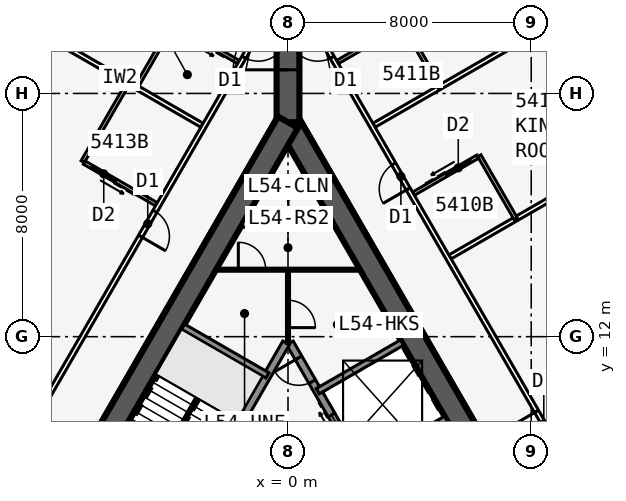
"""IFC4 building model, lengths in metres.
Left out: names, types, materials, properties, quantities, classifications, styles, units other than length and angle.
Written with IfcOpenShell. Run it as: python <this file> out.ifc"""

import sys

from ifc_helpers import new_model, si_unit, direction, frame, frame_2d, origin, place, context, subcontext, project, spatial, rectangle, extrude, element, fill, save


model = new_model("IFC4")
c1 = context("Model", 3, precision=1e-05, world=origin(), true_north=direction((0.0, 1.0)))
c2 = subcontext(c1, "Body", "Model", "MODEL_VIEW")
j1 = project(units=[si_unit("LENGTHUNIT", "METRE"), si_unit("PLANEANGLEUNIT", "RADIAN")], contexts=[c1])
p1 = place(None, origin())
s1 = spatial("IfcSite", under=j1, at=p1, CompositionType="ELEMENT")
p2 = place(p1, origin())
s2 = spatial("IfcBuilding", under=s1, at=p2, CompositionType="ELEMENT")
p3 = place(p2, frame((0.0, 0.0, 204.5)))
s3 = spatial("IfcBuildingStorey", under=s2, at=p3, CompositionType="ELEMENT", Elevation=204.5)
p4 = place(p3, frame((16.5, -9.526, 0.0), z_axis=(0.0, 0.0, 1.0), x_axis=(-0.499999749417, 0.866025548458, 0.0)))
e1 = element("IfcWall", 1, at=p4, inside=s3, PredefinedType="SHEAR", context=c2, shape_type="SweptSolid", body=[
    extrude(rectangle(XDim=33.0, YDim=0.75, at=frame_2d((16.5, 0.0))), origin(), (0.0, 0.0, 1.0), 3.6),
])
p5 = place(p4, frame((14.15, 0.0, 0.0)))
e2 = element("IfcOpeningElement", 2, at=p5, cuts=e1, PredefinedType="OPENING", context=c2, shape_type="SweptSolid", body=[
    extrude(rectangle(XDim=1.8, YDim=2.13, at=frame_2d((0.9, 1.065))), frame((0.0, 0.385, 0.0), z_axis=(0.0, -1.0, 0.0), x_axis=(1.0, 0.0, 0.0)), (0.0, 0.0, 1.0), 0.77),
])
p6 = place(p4, frame((12.6, 0.0, 0.0)))
e3 = element("IfcOpeningElement", 3, at=p6, cuts=e1, PredefinedType="OPENING", context=c2, shape_type="SweptSolid", body=[
    extrude(rectangle(XDim=1.0, YDim=2.13, at=frame_2d((0.5, 1.065))), frame((0.0, 0.385, 0.0), z_axis=(0.0, -1.0, 0.0), x_axis=(1.0, 0.0, 0.0)), (0.0, 0.0, 1.0), 0.77),
])
p7 = place(p3, frame((5.379, 2.586, 0.0), z_axis=(0.0, 0.0, 1.0), x_axis=(-0.500001375892, 0.866024609411, 0.0)))
e4 = element("IfcWall", 4, at=p7, inside=s3, PredefinedType="SOLIDWALL", context=c2, shape_type="SweptSolid", body=[
    extrude(rectangle(XDim=10.633, YDim=0.25, at=frame_2d((5.316, 0.0))), origin(), (0.0, 0.0, 1.0), 3.435),
])
p8 = place(p7, frame((9.164, 0.0, 0.0)))
e5 = element("IfcOpeningElement", 5, at=p8, cuts=e4, PredefinedType="OPENING", context=c2, shape_type="SweptSolid", body=[
    extrude(rectangle(XDim=0.9, YDim=2.13, at=frame_2d((0.45, 1.065))), frame((0.0, 0.135, 0.0), z_axis=(0.0, -1.0, 0.0), x_axis=(1.0, 0.0, 0.0)), (0.0, 0.0, 1.0), 0.27),
])
p9 = place(p7, frame((1.0, 0.0, 0.0)))
e6 = element("IfcOpeningElement", 6, at=p9, cuts=e4, PredefinedType="OPENING", context=c2, shape_type="SweptSolid", body=[
    extrude(rectangle(XDim=1.1, YDim=2.13, at=frame_2d((0.55, 1.065))), frame((0.0, 0.135, 0.0), z_axis=(0.0, -1.0, 0.0), x_axis=(1.0, 0.0, 0.0)), (0.0, 0.0, 1.0), 0.27),
])
p10 = place(p7, frame((3.9, 0.0, 0.0)))
e7 = element("IfcOpeningElement", 7, at=p10, cuts=e4, PredefinedType="OPENING", context=c2, shape_type="SweptSolid", body=[
    extrude(rectangle(XDim=1.1, YDim=2.13, at=frame_2d((0.55, 1.065))), frame((0.0, 0.135, 0.0), z_axis=(0.0, -1.0, 0.0), x_axis=(1.0, 0.0, 0.0)), (0.0, 0.0, 1.0), 0.27),
])
p11 = place(p7, frame((6.8, 0.0, 0.0)))
e8 = element("IfcOpeningElement", 8, at=p11, cuts=e4, PredefinedType="OPENING", context=c2, shape_type="SweptSolid", body=[
    extrude(rectangle(XDim=1.1, YDim=2.13, at=frame_2d((0.55, 1.065))), frame((0.0, 0.135, 0.0), z_axis=(0.0, -1.0, 0.0), x_axis=(1.0, 0.0, 0.0)), (0.0, 0.0, 1.0), 0.27),
])
for number, where, z_axis, x_axis in (
    (9, (2.429, 7.696, 0.0), (0.0, 0.0, 1.0), (0.866, 0.5, 0.0)),
    (10, (0.979, 10.207, 0.0), (0.0, 0.0, 1.0), (0.866, 0.5, 0.0)),
):
    element("IfcWall", number, at=place(p3, frame(where, z_axis=z_axis, x_axis=x_axis)), inside=s3, PredefinedType="SOLIDWALL", context=c2, shape_type="SweptSolid", body=[
        extrude(rectangle(XDim=3.2, YDim=0.2, at=frame_2d((1.6, 0.0))), origin(), (0.0, 0.0, 1.0), 3.435),
    ])
p12 = place(p3, frame((0.0, 19.052, 0.0), z_axis=(0.0, 0.0, 1.0), x_axis=(-0.499999749417, -0.866025548458, 0.0)))
e11 = element("IfcWall", 11, at=p12, inside=s3, PredefinedType="SHEAR", context=c2, shape_type="SweptSolid", body=[
    extrude(rectangle(XDim=33.0, YDim=0.75, at=frame_2d((16.5, 0.0))), origin(), (0.0, 0.0, 1.0), 3.6),
])
p13 = place(p12, frame((14.15, 0.0, 0.0)))
e12 = element("IfcOpeningElement", 12, at=p13, cuts=e11, PredefinedType="OPENING", context=c2, shape_type="SweptSolid", body=[
    extrude(rectangle(XDim=1.8, YDim=2.13, at=frame_2d((0.9, 1.065))), frame((0.0, 0.385, 0.0), z_axis=(0.0, -1.0, 0.0), x_axis=(1.0, 0.0, 0.0)), (0.0, 0.0, 1.0), 0.77),
])
p14 = place(p12, frame((12.6, 0.0, 0.0)))
e13 = element("IfcOpeningElement", 13, at=p14, cuts=e11, PredefinedType="OPENING", context=c2, shape_type="SweptSolid", body=[
    extrude(rectangle(XDim=1.0, YDim=2.13, at=frame_2d((0.5, 1.065))), frame((0.0, 0.385, 0.0), z_axis=(0.0, -1.0, 0.0), x_axis=(1.0, 0.0, 0.0)), (0.0, 0.0, 1.0), 0.77),
])
p15 = place(p3, frame((-0.062, 11.794, 0.0), z_axis=(0.0, 0.0, 1.0), x_axis=(-0.500006680225, -0.86602154692, 0.0)))
e14 = element("IfcWall", 14, at=p15, inside=s3, PredefinedType="SOLIDWALL", context=c2, shape_type="SweptSolid", body=[
    extrude(rectangle(XDim=7.733, YDim=0.25, at=frame_2d((3.866, 0.0))), origin(), (0.0, 0.0, 1.0), 3.435),
])
p16 = place(p3, frame((-0.679, 10.727, 0.0), z_axis=(0.0, 0.0, 1.0), x_axis=(-0.866008981251, 0.500028443584, 0.0)))
e15 = element("IfcWall", 15, at=p16, inside=s3, PredefinedType="SOLIDWALL", context=c2, shape_type="SweptSolid", body=[
    extrude(rectangle(XDim=3.2, YDim=0.2, at=frame_2d((1.6, 0.0))), origin(), (0.0, 0.0, 1.0), 3.435),
])
p17 = place(p3, frame((0.0, 19.052, 0.0), z_axis=(0.0, 0.0, 1.0), x_axis=(0.0, 1.0, 0.0)))
e16 = element("IfcWall", 16, at=p17, inside=s3, PredefinedType="SHEAR", context=c2, shape_type="SweptSolid", body=[
    extrude(rectangle(XDim=4.746, YDim=0.75, at=frame_2d((2.373, 0.0))), origin(), (0.0, 0.0, 1.0), 3.6),
])
p18 = place(p17, frame((1.725, 0.0, 0.0)))
e17 = element("IfcOpeningElement", 17, at=p18, cuts=e16, PredefinedType="OPENING", context=c2, shape_type="SweptSolid", body=[
    extrude(rectangle(XDim=1.8, YDim=2.13, at=frame_2d((0.9, 1.065))), frame((0.0, 0.385, 0.0), z_axis=(0.0, -1.0, 0.0), x_axis=(1.0, 0.0, 0.0)), (0.0, 0.0, 1.0), 0.77),
])
p19 = place(p3, frame((11.754, 18.304, 0.0), z_axis=(0.0, 0.0, 1.0), x_axis=(-0.664348996191, 0.747422511876, 0.0)))
e18 = element("IfcWall", 18, at=p19, inside=s3, PredefinedType="STANDARD", context=c2, shape_type="SweptSolid", body=[
    extrude(rectangle(XDim=5.105, YDim=0.25, at=frame_2d((2.552, 0.0))), origin(), (0.0, 0.0, 1.0), 3.435),
])
p20 = place(p19, frame((0.752, 0.0, 0.45)))
e19 = element("IfcOpeningElement", 19, at=p20, cuts=e18, PredefinedType="OPENING", context=c2, shape_type="SweptSolid", body=[
    extrude(rectangle(XDim=3.6, YDim=2.6, at=frame_2d((1.8, 1.3))), frame((0.0, 0.135, 0.0), z_axis=(0.0, -1.0, 0.0), x_axis=(1.0, 0.0, 0.0)), (0.0, 0.0, 1.0), 0.27),
])
p21 = place(p3, frame((20.102, -11.115, 0.0), z_axis=(0.0, 0.0, 1.0), x_axis=(-0.500000265775, 0.866025250339, 0.0)))
e20 = element("IfcWall", 20, at=p21, inside=s3, PredefinedType="PARTITIONING", context=c2, shape_type="SweptSolid", body=[
    extrude(rectangle(XDim=39.354, YDim=0.15, at=frame_2d((19.677, 0.0))), origin(), (0.0, 0.0, 1.0), 3.435),
])
p22 = place(p21, frame((1.665, 0.0, 0.0)))
e21 = element("IfcOpeningElement", 21, at=p22, cuts=e20, PredefinedType="OPENING", context=c2, shape_type="SweptSolid", body=[
    extrude(rectangle(XDim=0.95, YDim=2.13, at=frame_2d((0.475, 1.065))), frame((0.0, 0.085, 0.0), z_axis=(0.0, -1.0, 0.0), x_axis=(1.0, 0.0, 0.0)), (0.0, 0.0, 1.0), 0.17),
])
p23 = place(p21, frame((12.902, 0.0, 0.0)))
e22 = element("IfcOpeningElement", 22, at=p23, cuts=e20, PredefinedType="OPENING", context=c2, shape_type="SweptSolid", body=[
    extrude(rectangle(XDim=0.95, YDim=2.13, at=frame_2d((0.475, 1.065))), frame((0.0, 0.085, 0.0), z_axis=(0.0, -1.0, 0.0), x_axis=(1.0, 0.0, 0.0)), (0.0, 0.0, 1.0), 0.17),
])
p24 = place(p21, frame((17.302, 0.0, 0.0)))
e23 = element("IfcOpeningElement", 23, at=p24, cuts=e20, PredefinedType="OPENING", context=c2, shape_type="SweptSolid", body=[
    extrude(rectangle(XDim=0.95, YDim=2.13, at=frame_2d((0.475, 1.065))), frame((0.0, 0.085, 0.0), z_axis=(0.0, -1.0, 0.0), x_axis=(1.0, 0.0, 0.0)), (0.0, 0.0, 1.0), 0.17),
])
p25 = place(p21, frame((22.902, 0.0, 0.0)))
e24 = element("IfcOpeningElement", 24, at=p25, cuts=e20, PredefinedType="OPENING", context=c2, shape_type="SweptSolid", body=[
    extrude(rectangle(XDim=0.95, YDim=2.13, at=frame_2d((0.475, 1.065))), frame((0.0, 0.085, 0.0), z_axis=(0.0, -1.0, 0.0), x_axis=(1.0, 0.0, 0.0)), (0.0, 0.0, 1.0), 0.17),
])
p26 = place(p21, frame((32.302, 0.0, 0.0)))
e25 = element("IfcOpeningElement", 25, at=p26, cuts=e20, PredefinedType="OPENING", context=c2, shape_type="SweptSolid", body=[
    extrude(rectangle(XDim=0.95, YDim=2.13, at=frame_2d((0.475, 1.065))), frame((0.0, 0.085, 0.0), z_axis=(0.0, -1.0, 0.0), x_axis=(1.0, 0.0, 0.0)), (0.0, 0.0, 1.0), 0.17),
])
p27 = place(p21, frame((37.302, 0.0, 0.0)))
e26 = element("IfcOpeningElement", 26, at=p27, cuts=e20, PredefinedType="OPENING", context=c2, shape_type="SweptSolid", body=[
    extrude(rectangle(XDim=0.95, YDim=2.13, at=frame_2d((0.475, 1.065))), frame((0.0, 0.085, 0.0), z_axis=(0.0, -1.0, 0.0), x_axis=(1.0, 0.0, 0.0)), (0.0, 0.0, 1.0), 0.17),
])
p28 = place(p3, frame((5.329, 14.623, 0.0), z_axis=(0.0, 0.0, 1.0), x_axis=(0.866017877653, 0.500013035415, 0.0)))
e27 = element("IfcWall", 27, at=p28, inside=s3, PredefinedType="PARTITIONING", context=c2, shape_type="SweptSolid", body=[
    extrude(rectangle(XDim=7.273, YDim=0.15, at=frame_2d((3.636, 0.0))), origin(), (0.0, 0.0, 1.0), 2.589),
])
p29 = place(p3, frame((2.829, 18.954, 0.0), z_axis=(0.0, 0.0, 1.0), x_axis=(0.866026604282, 0.499997920671, 0.0)))
e28 = element("IfcWall", 28, at=p29, inside=s3, PredefinedType="PARTITIONING", context=c2, shape_type="SweptSolid", body=[
    extrude(rectangle(XDim=6.24, YDim=0.15, at=frame_2d((3.12, 0.0))), origin(), (0.0, 0.0, 1.0), 2.589),
])
p30 = place(p3, frame((7.493, 15.873, 0.0), z_axis=(0.0, 0.0, 1.0), x_axis=(-0.499957262057, 0.866050077142, 0.0)))
e29 = element("IfcWall", 29, at=p30, inside=s3, PredefinedType="PLUMBINGWALL", context=c2, shape_type="SweptSolid", body=[
    extrude(rectangle(XDim=2.4, YDim=0.12, at=frame_2d((1.2, 0.0))), origin(), (0.0, 0.0, 1.0), 3.435),
])
p31 = place(p3, frame((4.128, 16.702, 0.0), z_axis=(0.0, 0.0, 1.0), x_axis=(0.866048967903, 0.499959183527, 0.0)))
e30 = element("IfcWall", 30, at=p31, inside=s3, PredefinedType="PLUMBINGWALL", context=c2, shape_type="SweptSolid", body=[
    extrude(rectangle(XDim=2.44, YDim=0.12, at=frame_2d((1.22, 0.0))), origin(), (0.0, 0.0, 1.0), 3.435),
])
p32 = place(p31, frame((1.25, 0.0, 0.0)))
e31 = element("IfcOpeningElement", 31, at=p32, cuts=e30, PredefinedType="OPENING", context=c2, shape_type="SweptSolid", body=[
    extrude(rectangle(XDim=0.9, YDim=2.13, at=frame_2d((0.45, 1.065))), frame((0.0, 0.07, 0.0), z_axis=(0.0, -1.0, 0.0), x_axis=(1.0, 0.0, 0.0)), (0.0, 0.0, 1.0), 0.14),
])
p33 = place(p3, frame((4.993, 20.204, 0.0), z_axis=(0.0, 0.0, 1.0), x_axis=(-0.500001309137, 0.866024647952, 0.0)))
e32 = element("IfcWall", 32, at=p33, inside=s3, PredefinedType="PLUMBINGWALL", context=c2, shape_type="SweptSolid", body=[
    extrude(rectangle(XDim=2.4, YDim=0.12, at=frame_2d((1.2, 0.0))), origin(), (0.0, 0.0, 1.0), 3.435),
])
p34 = place(p3, frame((1.628, 21.032, 0.0), z_axis=(0.0, 0.0, 1.0), x_axis=(0.866048967903, 0.499959183527, 0.0)))
e33 = element("IfcWall", 33, at=p34, inside=s3, PredefinedType="PLUMBINGWALL", context=c2, shape_type="SweptSolid", body=[
    extrude(rectangle(XDim=2.44, YDim=0.12, at=frame_2d((1.22, 0.0))), origin(), (0.0, 0.0, 1.0), 3.435),
])
p35 = place(p34, frame((1.25, 0.0, 0.0)))
e34 = element("IfcOpeningElement", 34, at=p35, cuts=e33, PredefinedType="OPENING", context=c2, shape_type="SweptSolid", body=[
    extrude(rectangle(XDim=0.9, YDim=2.13, at=frame_2d((0.45, 1.065))), frame((0.0, 0.07, 0.0), z_axis=(0.0, -1.0, 0.0), x_axis=(1.0, 0.0, 0.0)), (0.0, 0.0, 1.0), 0.14),
])
p36 = place(p3, frame((-0.425, 22.966, 0.0), z_axis=(0.0, 0.0, 1.0), x_axis=(-0.500000265775, -0.866025250339, 0.0)))
e35 = element("IfcWall", 35, at=p36, inside=s3, PredefinedType="PARTITIONING", context=c2, shape_type="SweptSolid", body=[
    extrude(rectangle(XDim=39.354, YDim=0.15, at=frame_2d((19.677, 0.0))), origin(), (0.0, 0.0, 1.0), 3.435),
])
p37 = place(p36, frame((1.102, 0.0, 0.0)))
e36 = element("IfcOpeningElement", 36, at=p37, cuts=e35, PredefinedType="OPENING", context=c2, shape_type="SweptSolid", body=[
    extrude(rectangle(XDim=0.95, YDim=2.13, at=frame_2d((0.475, 1.065))), frame((0.0, 0.085, 0.0), z_axis=(0.0, -1.0, 0.0), x_axis=(1.0, 0.0, 0.0)), (0.0, 0.0, 1.0), 0.17),
])
p38 = place(p36, frame((7.902, 0.0, 0.0)))
e37 = element("IfcOpeningElement", 37, at=p38, cuts=e35, PredefinedType="OPENING", context=c2, shape_type="SweptSolid", body=[
    extrude(rectangle(XDim=0.95, YDim=2.13, at=frame_2d((0.475, 1.065))), frame((0.0, 0.085, 0.0), z_axis=(0.0, -1.0, 0.0), x_axis=(1.0, 0.0, 0.0)), (0.0, 0.0, 1.0), 0.17),
])
p39 = place(p36, frame((17.302, 0.0, 0.0)))
e38 = element("IfcOpeningElement", 38, at=p39, cuts=e35, PredefinedType="OPENING", context=c2, shape_type="SweptSolid", body=[
    extrude(rectangle(XDim=0.95, YDim=2.13, at=frame_2d((0.475, 1.065))), frame((0.0, 0.085, 0.0), z_axis=(0.0, -1.0, 0.0), x_axis=(1.0, 0.0, 0.0)), (0.0, 0.0, 1.0), 0.17),
])
p40 = place(p36, frame((26.702, 0.0, 0.0)))
e39 = element("IfcOpeningElement", 39, at=p40, cuts=e35, PredefinedType="OPENING", context=c2, shape_type="SweptSolid", body=[
    extrude(rectangle(XDim=0.95, YDim=2.13, at=frame_2d((0.475, 1.065))), frame((0.0, 0.085, 0.0), z_axis=(0.0, -1.0, 0.0), x_axis=(1.0, 0.0, 0.0)), (0.0, 0.0, 1.0), 0.17),
])
p41 = place(p36, frame((37.302, 0.0, 0.0)))
e40 = element("IfcOpeningElement", 40, at=p41, cuts=e35, PredefinedType="OPENING", context=c2, shape_type="SweptSolid", body=[
    extrude(rectangle(XDim=0.95, YDim=2.13, at=frame_2d((0.475, 1.065))), frame((0.0, 0.085, 0.0), z_axis=(0.0, -1.0, 0.0), x_axis=(1.0, 0.0, 0.0)), (0.0, 0.0, 1.0), 0.17),
])
p42 = place(p3, frame((-2.829, 18.954, 0.0), z_axis=(0.0, 0.0, 1.0), x_axis=(-0.866026604282, 0.499997920671, 0.0)))
e41 = element("IfcWall", 41, at=p42, inside=s3, PredefinedType="PARTITIONING", context=c2, shape_type="SweptSolid", body=[
    extrude(rectangle(XDim=6.24, YDim=0.15, at=frame_2d((3.12, 0.0))), origin(), (0.0, 0.0, 1.0), 2.589),
])
p43 = place(p3, frame((-3.793, 22.282, 0.0), z_axis=(0.0, 0.0, 1.0), x_axis=(-0.500001309137, -0.866024647952, 0.0)))
e42 = element("IfcWall", 42, at=p43, inside=s3, PredefinedType="PLUMBINGWALL", context=c2, shape_type="SweptSolid", body=[
    extrude(rectangle(XDim=2.4, YDim=0.12, at=frame_2d((1.2, 0.0))), origin(), (0.0, 0.0, 1.0), 3.435),
])
p44 = place(p3, frame((-1.628, 21.032, 0.0), z_axis=(0.0, 0.0, 1.0), x_axis=(-0.866048967903, 0.499959183527, 0.0)))
e43 = element("IfcWall", 43, at=p44, inside=s3, PredefinedType="PLUMBINGWALL", context=c2, shape_type="SweptSolid", body=[
    extrude(rectangle(XDim=2.44, YDim=0.12, at=frame_2d((1.22, 0.0))), origin(), (0.0, 0.0, 1.0), 3.435),
])
p45 = place(p44, frame((1.25, 0.0, 0.0)))
e44 = element("IfcOpeningElement", 44, at=p45, cuts=e43, PredefinedType="OPENING", context=c2, shape_type="SweptSolid", body=[
    extrude(rectangle(XDim=0.9, YDim=2.13, at=frame_2d((0.45, 1.065))), frame((0.0, 0.07, 0.0), z_axis=(0.0, -1.0, 0.0), x_axis=(1.0, 0.0, 0.0)), (0.0, 0.0, 1.0), 0.14),
])
p46 = place(p3, frame((-5.253, 20.354, 0.0), z_axis=(0.0, 0.0, 1.0), x_axis=(-0.499990139034, -0.866031096941, 0.0)))
e45 = element("IfcWall", 45, at=p46, inside=s3, PredefinedType="PLUMBINGWALL", context=c2, shape_type="SweptSolid", body=[
    extrude(rectangle(XDim=3.0, YDim=0.12, at=frame_2d((1.5, 0.0))), origin(), (0.0, 0.0, 1.0), 3.435),
])
p47 = place(p3, frame((-4.329, 16.355, 0.0), z_axis=(0.0, 0.0, 1.0), x_axis=(-0.866035715982, 0.499982138324, 0.0)))
e46 = element("IfcWall", 46, at=p47, inside=s3, PredefinedType="PLUMBINGWALL", context=c2, shape_type="SweptSolid", body=[
    extrude(rectangle(XDim=2.74, YDim=0.12, at=frame_2d((1.37, 0.0))), origin(), (0.0, 0.0, 1.0), 3.435),
])
p48 = place(p47, frame((1.55, 0.0, 0.0)))
e47 = element("IfcOpeningElement", 47, at=p48, cuts=e46, PredefinedType="OPENING", context=c2, shape_type="SweptSolid", body=[
    extrude(rectangle(XDim=0.9, YDim=2.13, at=frame_2d((0.45, 1.065))), frame((0.0, 0.07, 0.0), z_axis=(0.0, -1.0, 0.0), x_axis=(1.0, 0.0, 0.0)), (0.0, 0.0, 1.0), 0.14),
])
p49 = place(p3, frame((-1.501, 15.703, 0.0), z_axis=(0.0, 0.0, 1.0), x_axis=(1.0, 0.0, 0.0)))
e48 = element("IfcWall", 48, at=p49, inside=s3, PredefinedType="SOLIDWALL", context=c2, shape_type="SweptSolid", body=[
    extrude(rectangle(XDim=3.002, YDim=0.2, at=frame_2d((1.501, 0.0))), origin(), (0.0, 0.0, 1.0), 3.435),
])
p50 = place(p3, frame((-2.367, 14.203, 0.0), z_axis=(0.0, 0.0, 1.0), x_axis=(1.0, 0.0, 0.0)))
e49 = element("IfcWall", 49, at=p50, inside=s3, PredefinedType="PARTITIONING", context=c2, shape_type="SweptSolid", body=[
    extrude(rectangle(XDim=4.734, YDim=0.1, at=frame_2d((2.367, 0.0))), origin(), (0.0, 0.0, 1.0), 3.435),
])
p51 = place(p50, frame((0.734, 0.0, 0.0)))
e50 = element("IfcOpeningElement", 50, at=p51, cuts=e49, PredefinedType="OPENING", context=c2, shape_type="SweptSolid", body=[
    extrude(rectangle(XDim=0.9, YDim=2.13, at=frame_2d((0.45, 1.065))), frame((0.0, 0.06, 0.0), z_axis=(0.0, -1.0, 0.0), x_axis=(1.0, 0.0, 0.0)), (0.0, 0.0, 1.0), 0.12),
])
p52 = place(p3, frame((0.0, 14.203, 0.0), z_axis=(0.0, 0.0, 1.0), x_axis=(0.0, -1.0, 0.0)))
e51 = element("IfcWall", 51, at=p52, inside=s3, PredefinedType="PARTITIONING", context=c2, shape_type="SweptSolid", body=[
    extrude(rectangle(XDim=2.425, YDim=0.1, at=frame_2d((1.213, 0.0))), origin(), (0.0, 0.0, 1.0), 3.435),
])
p53 = place(p52, frame((1.005, 0.0, 0.0)))
e52 = element("IfcOpeningElement", 52, at=p53, cuts=e51, PredefinedType="OPENING", context=c2, shape_type="SweptSolid", body=[
    extrude(rectangle(XDim=0.9, YDim=2.13, at=frame_2d((0.45, 1.065))), frame((0.0, 0.06, 0.0), z_axis=(0.0, -1.0, 0.0), x_axis=(1.0, 0.0, 0.0)), (0.0, 0.0, 1.0), 0.12),
])
p54 = place(p3, frame((-2.988, 9.978, 0.0), z_axis=(0.0, 0.0, 1.0), x_axis=(-0.499992232847, -0.866029888106, 0.0)))
e53 = element("IfcWall", 53, at=p54, inside=s3, PredefinedType="SOLIDWALL", context=c2, shape_type="SweptSolid", body=[
    extrude(rectangle(XDim=2.794, YDim=0.1, at=frame_2d((1.397, 0.0))), origin(), (0.0, 0.0, 1.0), 3.6),
])
p55 = place(p25, origin())
e54 = element("IfcDoor", 54, at=p55, inside=s3, OperationType="SINGLE_SWING_RIGHT", PredefinedType="DOOR", context=c2, shape_type="SweptSolid", body=[
    extrude(rectangle(XDim=0.95, YDim=2.13, at=frame_2d((0.475, 1.065))), frame((0.0, 0.025, 0.0), z_axis=(0.0, -1.0, 0.0), x_axis=(1.0, 0.0, 0.0)), (0.0, 0.0, 1.0), 0.05),
])
fill(e24, e54)
p56 = place(p32, origin())
e55 = element("IfcDoor", 55, at=p56, inside=s3, OperationType="SLIDING_TO_LEFT", PredefinedType="DOOR", context=c2, shape_type="SweptSolid", body=[
    extrude(rectangle(XDim=0.9, YDim=2.13, at=frame_2d((0.45, 1.065))), frame((0.0, 0.025, 0.0), z_axis=(0.0, -1.0, 0.0), x_axis=(1.0, 0.0, 0.0)), (0.0, 0.0, 1.0), 0.05),
])
fill(e31, e55)
p57 = place(p26, origin())
e56 = element("IfcDoor", 56, at=p57, inside=s3, OperationType="SINGLE_SWING_LEFT", PredefinedType="DOOR", context=c2, shape_type="SweptSolid", body=[
    extrude(rectangle(XDim=0.95, YDim=2.13, at=frame_2d((0.475, 1.065))), frame((0.0, 0.025, 0.0), z_axis=(0.0, -1.0, 0.0), x_axis=(1.0, 0.0, 0.0)), (0.0, 0.0, 1.0), 0.05),
])
fill(e25, e56)
p58 = place(p27, origin())
e57 = element("IfcDoor", 57, at=p58, inside=s3, OperationType="SINGLE_SWING_RIGHT", PredefinedType="DOOR", context=c2, shape_type="SweptSolid", body=[
    extrude(rectangle(XDim=0.95, YDim=2.13, at=frame_2d((0.475, 1.065))), frame((0.0, 0.025, 0.0), z_axis=(0.0, -1.0, 0.0), x_axis=(1.0, 0.0, 0.0)), (0.0, 0.0, 1.0), 0.05),
])
fill(e26, e57)
p59 = place(p37, origin())
e58 = element("IfcDoor", 58, at=p59, inside=s3, OperationType="SINGLE_SWING_LEFT", PredefinedType="DOOR", context=c2, shape_type="SweptSolid", body=[
    extrude(rectangle(XDim=0.95, YDim=2.13, at=frame_2d((0.475, 1.065))), frame((0.0, 0.025, 0.0), z_axis=(0.0, -1.0, 0.0), x_axis=(1.0, 0.0, 0.0)), (0.0, 0.0, 1.0), 0.05),
])
fill(e36, e58)
p60 = place(p48, origin())
e59 = element("IfcDoor", 59, at=p60, inside=s3, OperationType="SLIDING_TO_LEFT", PredefinedType="DOOR", context=c2, shape_type="SweptSolid", body=[
    extrude(rectangle(XDim=0.9, YDim=2.13, at=frame_2d((0.45, 1.065))), frame((0.0, 0.025, 0.0), z_axis=(0.0, -1.0, 0.0), x_axis=(1.0, 0.0, 0.0)), (0.0, 0.0, 1.0), 0.05),
])
fill(e47, e59)
p61 = place(p38, origin())
e60 = element("IfcDoor", 60, at=p61, inside=s3, OperationType="SINGLE_SWING_RIGHT", PredefinedType="DOOR", context=c2, shape_type="SweptSolid", body=[
    extrude(rectangle(XDim=0.95, YDim=2.13, at=frame_2d((0.475, 1.065))), frame((0.0, 0.025, 0.0), z_axis=(0.0, -1.0, 0.0), x_axis=(1.0, 0.0, 0.0)), (0.0, 0.0, 1.0), 0.05),
])
fill(e37, e60)
p62 = place(p18, origin())
e61 = element("IfcDoor", 61, at=p62, inside=s3, OperationType="DOUBLE_DOOR_DOUBLE_SWING", PredefinedType="DOOR", context=c2, shape_type="SweptSolid", body=[
    extrude(rectangle(XDim=1.8, YDim=2.13, at=frame_2d((0.9, 1.065))), frame((0.0, 0.025, 0.0), z_axis=(0.0, -1.0, 0.0), x_axis=(1.0, 0.0, 0.0)), (0.0, 0.0, 1.0), 0.05),
])
fill(e17, e61)
p63 = place(p51, origin())
e62 = element("IfcDoor", 62, at=p63, inside=s3, OperationType="SINGLE_SWING_LEFT", PredefinedType="DOOR", context=c2, shape_type="SweptSolid", body=[
    extrude(rectangle(XDim=0.9, YDim=2.13, at=frame_2d((0.45, 1.065))), frame((0.0, 0.025, 0.0), z_axis=(0.0, -1.0, 0.0), x_axis=(1.0, 0.0, 0.0)), (0.0, 0.0, 1.0), 0.05),
])
fill(e50, e62)
p64 = place(p8, origin())
e63 = element("IfcDoor", 63, at=p64, inside=s3, OperationType="SINGLE_SWING_RIGHT", PredefinedType="DOOR", context=c2, shape_type="SweptSolid", body=[
    extrude(rectangle(XDim=0.9, YDim=2.13, at=frame_2d((0.45, 1.065))), frame((0.0, 0.025, 0.0), z_axis=(0.0, -1.0, 0.0), x_axis=(1.0, 0.0, 0.0)), (0.0, 0.0, 1.0), 0.05),
])
fill(e5, e63)
p65 = place(p53, origin())
e64 = element("IfcDoor", 64, at=p65, inside=s3, OperationType="SINGLE_SWING_RIGHT", PredefinedType="DOOR", context=c2, shape_type="SweptSolid", body=[
    extrude(rectangle(XDim=0.9, YDim=2.13, at=frame_2d((0.45, 1.065))), frame((0.0, 0.025, 0.0), z_axis=(0.0, -1.0, 0.0), x_axis=(1.0, 0.0, 0.0)), (0.0, 0.0, 1.0), 0.05),
])
fill(e52, e64)
p66 = place(p11, origin())
e65 = element("IfcDoor", 65, at=p66, inside=s3, OperationType="DOUBLE_DOOR_SLIDING", PredefinedType="USERDEFINED", context=c2, shape_type="SweptSolid", body=[
    extrude(rectangle(XDim=1.1, YDim=2.13, at=frame_2d((0.55, 1.065))), frame((0.0, 0.025, 0.0), z_axis=(0.0, -1.0, 0.0), x_axis=(1.0, 0.0, 0.0)), (0.0, 0.0, 1.0), 0.05),
])
fill(e8, e65)
save(model, sys.argv[1])
